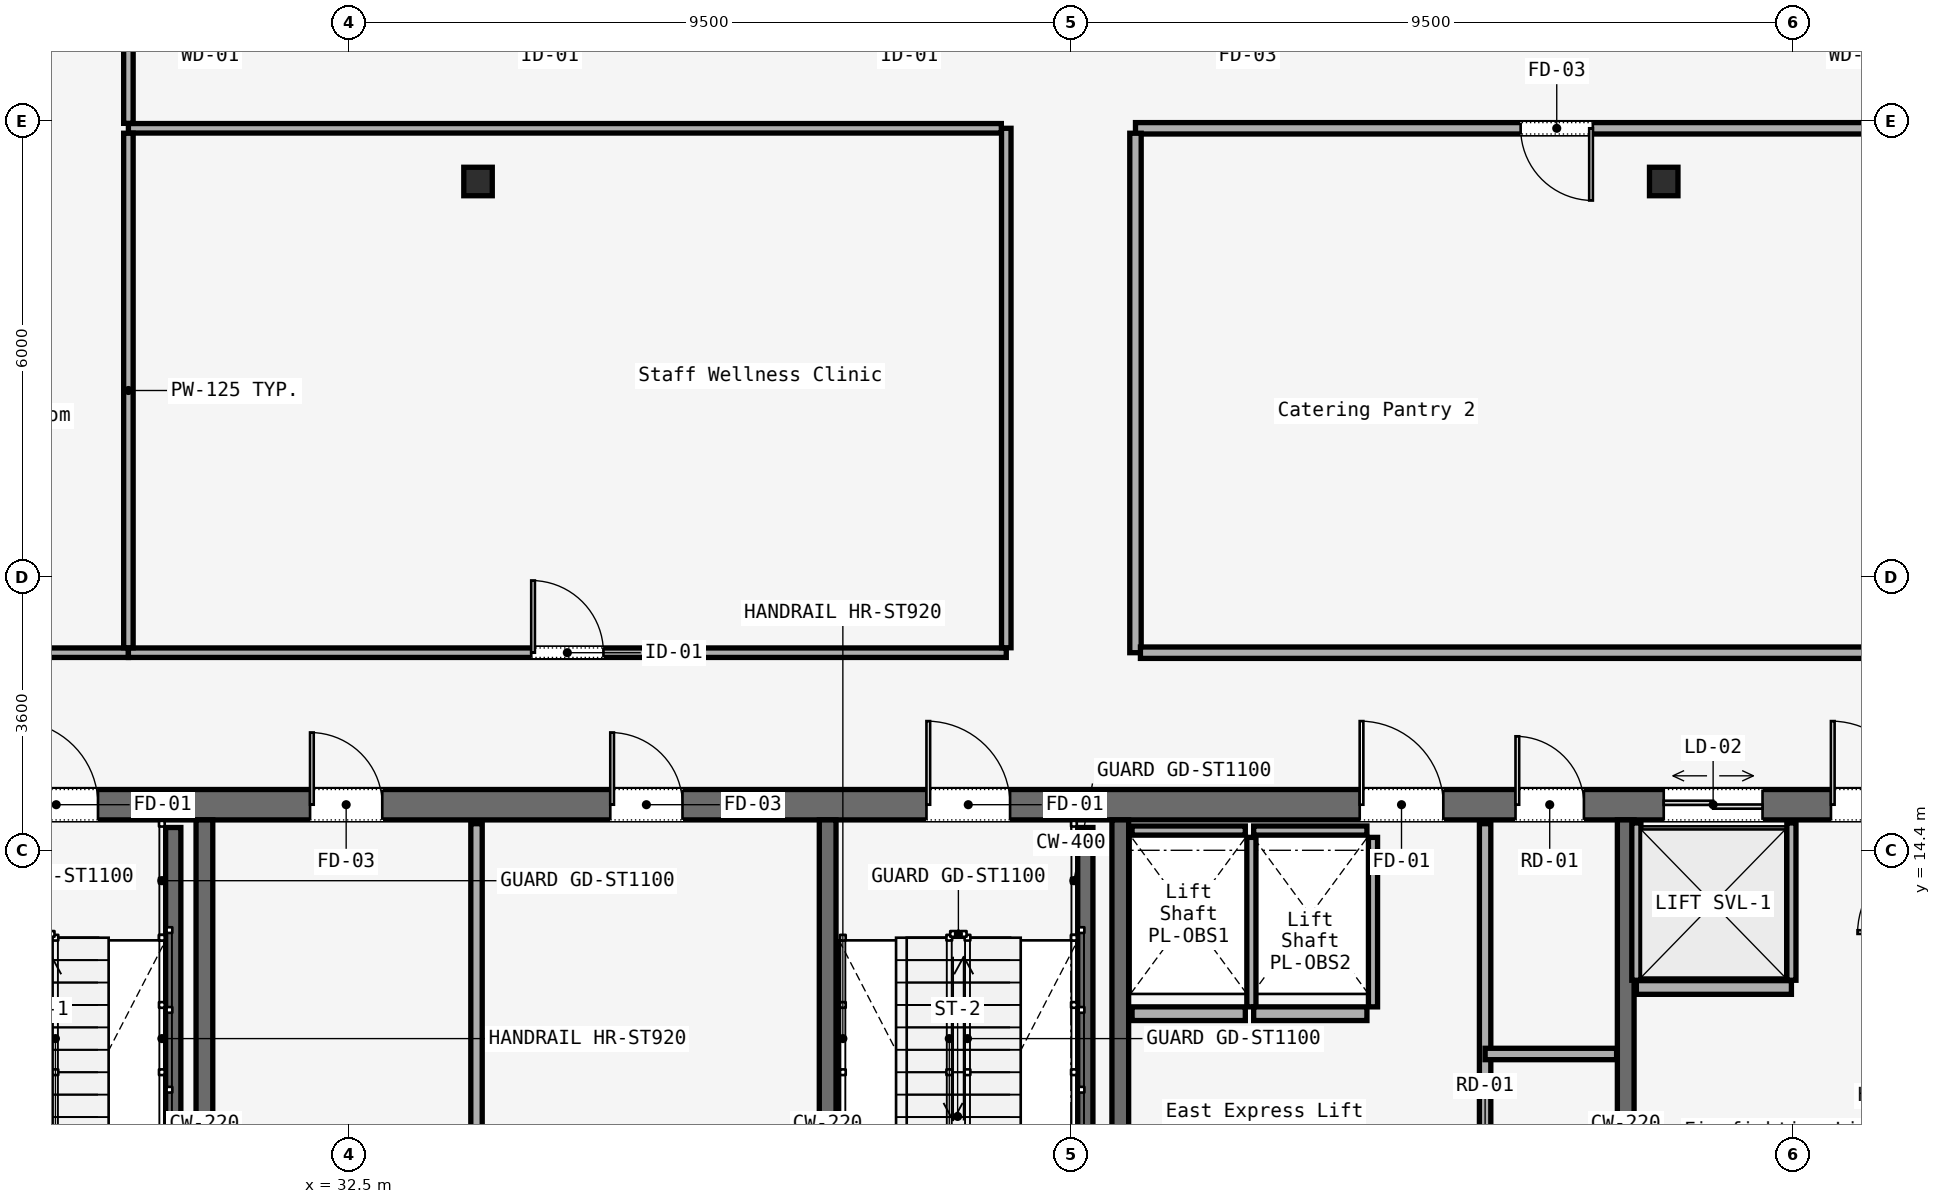
"""IFC4 building model, lengths in metres.
Left out: names, types, materials, properties, quantities, classifications, styles, units other than length and angle.
Written with IfcOpenShell. Run it as: python <this file> out.ifc"""

import sys

from ifc_helpers import new_model, si_unit, direction, frame, frame_2d, origin, origin_2d, place, context, subcontext, project, spatial, rectangle, i_section, extrude, element, fill, save


model = new_model("IFC4")
c1 = context("Model", 3, precision=1e-05, world=origin(), true_north=direction((0.0, 1.0)))
c2 = subcontext(c1, "Body", "Model", "MODEL_VIEW")
j1 = project(units=[si_unit("LENGTHUNIT", "METRE"), si_unit("PLANEANGLEUNIT", "RADIAN")], contexts=[c1])
p1 = place(None, origin())
s1 = spatial("IfcSite", under=j1, at=p1, CompositionType="ELEMENT")
p2 = place(p1, origin())
s2 = spatial("IfcBuilding", under=s1, at=p2, CompositionType="ELEMENT")
p3 = place(p2, frame((0.0, 0.0, 259.8)))
s3 = spatial("IfcBuildingStorey", under=s2, at=p3, CompositionType="ELEMENT", Elevation=259.8)
p4 = place(p3, frame((26.45, 15.0, 0.0), z_axis=(0.0, 0.0, 1.0), x_axis=(1.0, 0.0, 0.0)))
e1 = element("IfcWall", 1, at=p4, inside=s3, PredefinedType="SOLIDWALL", context=c2, shape_type="SweptSolid", body=[
    extrude(rectangle(XDim=31.1, YDim=0.4, at=frame_2d((15.55, 0.0))), origin(), (0.0, 0.0, 1.0), 3.58),
])
p5 = place(p4, frame((1.65, 0.0, 0.0)))
e2 = element("IfcOpeningElement", 2, at=p5, cuts=e1, PredefinedType="OPENING", context=c2, shape_type="SweptSolid", body=[
    extrude(rectangle(XDim=1.1, YDim=2.2, at=frame_2d((0.55, 1.1))), frame((0.0, 0.2, 0.0), z_axis=(0.0, -1.0, 0.0), x_axis=(1.0, 0.0, 0.0)), (0.0, 0.0, 1.0), 0.4),
])
p6 = place(p4, frame((13.65, 0.0, 0.0)))
e3 = element("IfcOpeningElement", 3, at=p6, cuts=e1, PredefinedType="OPENING", context=c2, shape_type="SweptSolid", body=[
    extrude(rectangle(XDim=1.1, YDim=2.2, at=frame_2d((0.55, 1.1))), frame((0.0, 0.2, 0.0), z_axis=(0.0, -1.0, 0.0), x_axis=(1.0, 0.0, 0.0)), (0.0, 0.0, 1.0), 0.4),
])
p7 = place(p4, frame((25.55, 0.0, 0.0)))
e4 = element("IfcOpeningElement", 4, at=p7, cuts=e1, PredefinedType="OPENING", context=c2, shape_type="SweptSolid", body=[
    extrude(rectangle(XDim=1.1, YDim=2.2, at=frame_2d((0.55, 1.1))), frame((0.0, 0.2, 0.0), z_axis=(0.0, -1.0, 0.0), x_axis=(1.0, 0.0, 0.0)), (0.0, 0.0, 1.0), 0.4),
])
p8 = place(p4, frame((19.35, 0.0, 0.0)))
e5 = element("IfcOpeningElement", 5, at=p8, cuts=e1, PredefinedType="OPENING", context=c2, shape_type="SweptSolid", body=[
    extrude(rectangle(XDim=1.1, YDim=2.2, at=frame_2d((0.55, 1.1))), frame((0.0, 0.2, 0.0), z_axis=(0.0, -1.0, 0.0), x_axis=(1.0, 0.0, 0.0)), (0.0, 0.0, 1.0), 0.4),
])
p9 = place(p4, frame((21.4, 0.0, 0.0)))
e6 = element("IfcOpeningElement", 6, at=p9, cuts=e1, PredefinedType="OPENING", context=c2, shape_type="SweptSolid", body=[
    extrude(rectangle(XDim=0.9, YDim=2.1, at=frame_2d((0.45, 1.05))), frame((0.0, 0.2, 0.0), z_axis=(0.0, -1.0, 0.0), x_axis=(1.0, 0.0, 0.0)), (0.0, 0.0, 1.0), 0.4),
])
p10 = place(p4, frame((5.54, 0.0, 0.0)))
e7 = element("IfcOpeningElement", 7, at=p10, cuts=e1, PredefinedType="OPENING", context=c2, shape_type="SweptSolid", body=[
    extrude(rectangle(XDim=0.95, YDim=2.2, at=frame_2d((0.475, 1.1))), frame((0.0, 0.2, 0.0), z_axis=(0.0, -1.0, 0.0), x_axis=(1.0, 0.0, 0.0)), (0.0, 0.0, 1.0), 0.4),
])
p11 = place(p4, frame((9.49, 0.0, 0.0)))
e8 = element("IfcOpeningElement", 8, at=p11, cuts=e1, PredefinedType="OPENING", context=c2, shape_type="SweptSolid", body=[
    extrude(rectangle(XDim=0.95, YDim=2.2, at=frame_2d((0.475, 1.1))), frame((0.0, 0.2, 0.0), z_axis=(0.0, -1.0, 0.0), x_axis=(1.0, 0.0, 0.0)), (0.0, 0.0, 1.0), 0.4),
])
p12 = place(p4, frame((23.35, 0.0, 0.0)))
e9 = element("IfcOpeningElement", 9, at=p12, cuts=e1, PredefinedType="OPENING", context=c2, shape_type="SweptSolid", body=[
    extrude(rectangle(XDim=1.3, YDim=2.3, at=frame_2d((0.65, 1.15))), frame((0.0, 0.2, 0.0), z_axis=(0.0, -1.0, 0.0), x_axis=(1.0, 0.0, 0.0)), (0.0, 0.0, 1.0), 0.4),
])
for number, where, z_axis, x_axis in (
    (10, (30.6, 5.8, 0.0), (0.0, 0.0, 1.0), (0.0, 1.0, 0.0)),
    (11, (38.8, 5.8, 0.0), (0.0, 0.0, 1.0), (0.0, 1.0, 0.0)),
    (12, (42.65, 5.8, 0.0), (0.0, 0.0, 1.0), (0.0, 1.0, 0.0)),
    (13, (49.3, 5.8, 0.0), (0.0, 0.0, 1.0), (0.0, 1.0, 0.0)),
):
    element("IfcWall", number, at=place(p3, frame(where, z_axis=z_axis, x_axis=x_axis)), inside=s3, PredefinedType="SOLIDWALL", context=c2, shape_type="SweptSolid", body=[
        extrude(rectangle(XDim=9.0, YDim=0.22, at=frame_2d((4.5, 0.0))), origin(), (0.0, 0.0, 1.0), 3.58),
    ])
for number, where, z_axis, x_axis in (
    (14, (34.2, 23.2, 0.0), (0.0, 0.0, 1.0), (1.0, 0.0, 0.0)),
    (15, (49.8, 23.2, 0.0), (0.0, 0.0, 1.0), (1.0, 0.0, 0.0)),
):
    element("IfcColumn", number, at=place(p3, frame(where, z_axis=z_axis, x_axis=x_axis)), inside=s3, PredefinedType="COLUMN", context=c2, shape_type="SweptSolid", body=[
        extrude(i_section(OverallWidth=0.375, OverallDepth=0.375, WebThickness=0.017, FlangeThickness=0.027, FilletRadius=0.015, at=origin_2d()), origin(), (0.0, 0.0, 1.0), 3.58),
    ])
for number, where, z_axis, x_axis in (
    (16, (30.19, 14.7, 0.0), (0.0, 0.0, 1.0), (0.0, -1.0, 0.0)),
    (17, (42.19, 14.7, 0.0), (0.0, 0.0, 1.0), (0.0, -1.0, 0.0)),
):
    element("IfcWall", number, at=place(p3, frame(where, z_axis=z_axis, x_axis=x_axis)), inside=s3, PredefinedType="SOLIDWALL", context=c2, shape_type="SweptSolid", body=[
        extrude(rectangle(XDim=7.65, YDim=0.2, at=frame_2d((3.825, 0.0))), origin(), (0.0, 0.0, 1.0), 3.8),
    ])
p13 = place(p3, frame((47.45, 5.9, 0.0), z_axis=(0.0, 0.0, 1.0), x_axis=(0.0, 1.0, 0.0)))
e18 = element("IfcWall", 18, at=p13, inside=s3, PredefinedType="PARTITIONING", context=c2, shape_type="SweptSolid", body=[
    extrude(rectangle(XDim=8.85, YDim=0.15, at=frame_2d((4.425, 0.0))), origin(), (0.0, 0.0, 1.0), 3.01),
])
p14 = place(p13, frame((3.9, 0.0, 0.0)))
e19 = element("IfcOpeningElement", 19, at=p14, cuts=e18, PredefinedType="OPENING", context=c2, shape_type="SweptSolid", body=[
    extrude(rectangle(XDim=0.9, YDim=2.1, at=frame_2d((0.45, 1.05))), frame((0.0, 0.075, 0.0), z_axis=(0.0, -1.0, 0.0), x_axis=(1.0, 0.0, 0.0)), (0.0, 0.0, 1.0), 0.15),
])
p15 = place(p3, frame((47.45, 11.72, 0.0), z_axis=(0.0, 0.0, 1.0), x_axis=(1.0, 0.0, 0.0)))
e20 = element("IfcWall", 20, at=p15, inside=s3, PredefinedType="PARTITIONING", context=c2, shape_type="SweptSolid", body=[
    extrude(rectangle(XDim=1.73, YDim=0.15, at=frame_2d((0.865, 0.0))), origin(), (0.0, 0.0, 1.0), 3.01),
])
p16 = place(p3, frame((34.18, 5.9, 0.0), z_axis=(0.0, 0.0, 1.0), x_axis=(0.0, 1.0, 0.0)))
e21 = element("IfcWall", 21, at=p16, inside=s3, PredefinedType="PARTITIONING", context=c2, shape_type="SweptSolid", body=[
    extrude(rectangle(XDim=8.85, YDim=0.15, at=frame_2d((4.425, 0.0))), origin(), (0.0, 0.0, 1.0), 3.01),
])
p17 = place(p3, frame((42.805, 12.25, 0.0), z_axis=(0.0, 0.0, 1.0), x_axis=(1.0, 0.0, 0.0)))
e22 = element("IfcWall", 22, at=p17, inside=s3, PredefinedType="SOLIDWALL", context=c2, shape_type="SweptSolid", body=[
    extrude(rectangle(XDim=1.49, YDim=0.18, at=frame_2d((0.745, 0.0))), origin(), (0.0, 0.0, 1.0), 3.01),
])
p18 = place(p3, frame((42.805, 14.66, 0.0), z_axis=(0.0, 0.0, 1.0), x_axis=(1.0, 0.0, 0.0)))
e23 = element("IfcWall", 23, at=p18, inside=s3, PredefinedType="SOLIDWALL", context=c2, shape_type="SweptSolid", body=[
    extrude(rectangle(XDim=1.49, YDim=0.12, at=frame_2d((0.745, 0.0))), origin(), (0.0, 0.0, 1.0), 3.01),
])
p19 = place(p3, frame((44.375, 12.34, 0.0), z_axis=(0.0, 0.0, 1.0), x_axis=(0.0, 1.0, 0.0)))
e24 = element("IfcWall", 24, at=p19, inside=s3, PredefinedType="SOLIDWALL", context=c2, shape_type="SweptSolid", body=[
    extrude(rectangle(XDim=2.23, YDim=0.12, at=frame_2d((1.115, 0.0))), origin(), (0.0, 0.0, 1.0), 3.01),
])
p20 = place(p3, frame((44.405, 12.25, 0.0), z_axis=(0.0, 0.0, 1.0), x_axis=(1.0, 0.0, 0.0)))
e25 = element("IfcWall", 25, at=p20, inside=s3, PredefinedType="SOLIDWALL", context=c2, shape_type="SweptSolid", body=[
    extrude(rectangle(XDim=1.49, YDim=0.18, at=frame_2d((0.745, 0.0))), origin(), (0.0, 0.0, 1.0), 3.01),
])
p21 = place(p3, frame((44.405, 14.66, 0.0), z_axis=(0.0, 0.0, 1.0), x_axis=(1.0, 0.0, 0.0)))
e26 = element("IfcWall", 26, at=p21, inside=s3, PredefinedType="SOLIDWALL", context=c2, shape_type="SweptSolid", body=[
    extrude(rectangle(XDim=1.49, YDim=0.12, at=frame_2d((0.745, 0.0))), origin(), (0.0, 0.0, 1.0), 3.01),
])
p22 = place(p3, frame((45.975, 12.34, 0.0), z_axis=(0.0, 0.0, 1.0), x_axis=(0.0, 1.0, 0.0)))
e27 = element("IfcWall", 27, at=p22, inside=s3, PredefinedType="SOLIDWALL", context=c2, shape_type="SweptSolid", body=[
    extrude(rectangle(XDim=2.23, YDim=0.12, at=frame_2d((1.115, 0.0))), origin(), (0.0, 0.0, 1.0), 3.01),
])
p23 = place(p3, frame((49.44, 12.595, 0.0), z_axis=(0.0, 0.0, 1.0), x_axis=(1.0, 0.0, 0.0)))
e28 = element("IfcWall", 28, at=p23, inside=s3, PredefinedType="SOLIDWALL", context=c2, shape_type="SweptSolid", body=[
    extrude(rectangle(XDim=2.04, YDim=0.18, at=frame_2d((1.02, 0.0))), origin(), (0.0, 0.0, 1.0), 3.01),
])
for number, where, z_axis, x_axis in (
    (29, (49.44, 12.69, 0.0), (0.0, 0.0, 1.0), (0.0, 1.0, 0.0)),
    (30, (51.48, 12.69, 0.0), (0.0, 0.0, 1.0), (0.0, 1.0, 0.0)),
):
    element("IfcWall", number, at=place(p3, frame(where, z_axis=z_axis, x_axis=x_axis)), inside=s3, PredefinedType="SOLIDWALL", context=c2, shape_type="SweptSolid", body=[
        extrude(rectangle(XDim=2.07, YDim=0.12, at=frame_2d((1.035, 0.0))), origin(), (0.0, 0.0, 1.0), 3.01),
    ])
p24 = place(p3, frame((23.38, 17.0, 0.0), z_axis=(0.0, 0.0, 1.0), x_axis=(1.0, 0.0, 0.0)))
e31 = element("IfcWall", 31, at=p24, inside=s3, PredefinedType="PARTITIONING", context=c2, shape_type="SweptSolid", body=[
    extrude(rectangle(XDim=6.22, YDim=0.125, at=frame_2d((3.11, 0.0))), origin(), (0.0, 0.0, 1.0), 3.01),
])
p25 = place(p24, frame((2.41, 0.0, 0.0)))
e32 = element("IfcOpeningElement", 32, at=p25, cuts=e31, PredefinedType="OPENING", context=c2, shape_type="SweptSolid", body=[
    extrude(rectangle(XDim=1.4, YDim=2.2, at=frame_2d((0.7, 1.1))), frame((0.0, 0.062, 0.0), z_axis=(0.0, -1.0, 0.0), x_axis=(1.0, 0.0, 0.0)), (0.0, 0.0, 1.0), 0.125),
])
p26 = place(p3, frame((29.6, 17.0, 0.0), z_axis=(0.0, 0.0, 1.0), x_axis=(1.0, 0.0, 0.0)))
e33 = element("IfcWall", 33, at=p26, inside=s3, PredefinedType="PARTITIONING", context=c2, shape_type="SweptSolid", body=[
    extrude(rectangle(XDim=11.55, YDim=0.125, at=frame_2d((5.775, 0.0))), origin(), (0.0, 0.0, 1.0), 3.01),
])
p27 = place(p26, frame((5.3, 0.0, 0.0)))
e34 = element("IfcOpeningElement", 34, at=p27, cuts=e33, PredefinedType="OPENING", context=c2, shape_type="SweptSolid", body=[
    extrude(rectangle(XDim=0.95, YDim=2.2, at=frame_2d((0.475, 1.1))), frame((0.0, 0.062, 0.0), z_axis=(0.0, -1.0, 0.0), x_axis=(1.0, 0.0, 0.0)), (0.0, 0.0, 1.0), 0.125),
])
p28 = place(p3, frame((41.15, 17.065, 0.0), z_axis=(0.0, 0.0, 1.0), x_axis=(0.0, 1.0, 0.0)))
e35 = element("IfcWall", 35, at=p28, inside=s3, PredefinedType="PARTITIONING", context=c2, shape_type="SweptSolid", body=[
    extrude(rectangle(XDim=6.835, YDim=0.125, at=frame_2d((3.417, 0.0))), origin(), (0.0, 0.0, 1.0), 3.01),
])
p29 = place(p3, frame((41.085, 23.9, 0.0), z_axis=(0.0, 0.0, 1.0), x_axis=(-1.0, 0.0, 0.0)))
e36 = element("IfcWall", 36, at=p29, inside=s3, PredefinedType="PARTITIONING", context=c2, shape_type="SweptSolid", body=[
    extrude(rectangle(XDim=11.485, YDim=0.125, at=frame_2d((5.742, 0.0))), origin(), (0.0, 0.0, 1.0), 3.01),
])
p30 = place(p3, frame((29.6, 23.965, 0.0), z_axis=(0.0, 0.0, 1.0), x_axis=(0.0, 1.0, 0.0)))
e37 = element("IfcWall", 37, at=p30, inside=s3, PredefinedType="PARTITIONING", context=c2, shape_type="SweptSolid", body=[
    extrude(rectangle(XDim=1.635, YDim=0.125, at=frame_2d((0.817, 0.0))), origin(), (0.0, 0.0, 1.0), 3.01),
])
p31 = place(p3, frame((53.935, 23.9, 0.0), z_axis=(0.0, 0.0, 1.0), x_axis=(-1.0, 0.0, 0.0)))
e38 = element("IfcWall", 38, at=p31, inside=s3, PredefinedType="PARTITIONING", context=c2, shape_type="SweptSolid", body=[
    extrude(rectangle(XDim=11.085, YDim=0.15, at=frame_2d((5.542, 0.0))), origin(), (0.0, 0.0, 1.0), 3.01),
])
p32 = place(p31, frame((5.067, 0.0, 0.0)))
e39 = element("IfcOpeningElement", 39, at=p32, cuts=e38, PredefinedType="OPENING", context=c2, shape_type="SweptSolid", body=[
    extrude(rectangle(XDim=0.95, YDim=2.2, at=frame_2d((0.475, 1.1))), frame((0.0, 0.075, 0.0), z_axis=(0.0, -1.0, 0.0), x_axis=(1.0, 0.0, 0.0)), (0.0, 0.0, 1.0), 0.15),
])
p33 = place(p3, frame((42.85, 23.835, 0.0), z_axis=(0.0, 0.0, 1.0), x_axis=(0.0, -1.0, 0.0)))
e40 = element("IfcWall", 40, at=p33, inside=s3, PredefinedType="PARTITIONING", context=c2, shape_type="SweptSolid", body=[
    extrude(rectangle(XDim=6.835, YDim=0.15, at=frame_2d((3.417, 0.0))), origin(), (0.0, 0.0, 1.0), 3.01),
])
p34 = place(p3, frame((42.915, 17.0, 0.0), z_axis=(0.0, 0.0, 1.0), x_axis=(1.0, 0.0, 0.0)))
e41 = element("IfcWall", 41, at=p34, inside=s3, PredefinedType="PARTITIONING", context=c2, shape_type="SweptSolid", body=[
    extrude(rectangle(XDim=11.085, YDim=0.15, at=frame_2d((5.542, 0.0))), origin(), (0.0, 0.0, 1.0), 3.01),
])
p35 = place(p3, frame((29.6, 23.835, 0.0), z_axis=(0.0, 0.0, 1.0), x_axis=(0.0, -1.0, 0.0)))
e42 = element("IfcWall", 42, at=p35, inside=s3, PredefinedType="PARTITIONING", context=c2, shape_type="SweptSolid", body=[
    extrude(rectangle(XDim=6.77, YDim=0.125, at=frame_2d((3.385, 0.0))), origin(), (0.0, 0.0, 1.0), 3.01),
])
p36 = place(p5, origin())
e43 = element("IfcDoor", 43, at=p36, inside=s3, OperationType="SINGLE_SWING_RIGHT", PredefinedType="DOOR", context=c2, shape_type="SweptSolid", body=[
    extrude(rectangle(XDim=1.1, YDim=2.2, at=frame_2d((0.55, 1.1))), frame((0.0, 0.025, 0.0), z_axis=(0.0, -1.0, 0.0), x_axis=(1.0, 0.0, 0.0)), (0.0, 0.0, 1.0), 0.05),
])
fill(e2, e43)
p37 = place(p6, origin())
e44 = element("IfcDoor", 44, at=p37, inside=s3, OperationType="SINGLE_SWING_LEFT", PredefinedType="DOOR", context=c2, shape_type="SweptSolid", body=[
    extrude(rectangle(XDim=1.1, YDim=2.2, at=frame_2d((0.55, 1.1))), frame((0.0, 0.025, 0.0), z_axis=(0.0, -1.0, 0.0), x_axis=(1.0, 0.0, 0.0)), (0.0, 0.0, 1.0), 0.05),
])
fill(e3, e44)
p38 = place(p7, origin())
e45 = element("IfcDoor", 45, at=p38, inside=s3, OperationType="SINGLE_SWING_RIGHT", PredefinedType="DOOR", context=c2, shape_type="SweptSolid", body=[
    extrude(rectangle(XDim=1.1, YDim=2.2, at=frame_2d((0.55, 1.1))), frame((0.0, 0.025, 0.0), z_axis=(0.0, -1.0, 0.0), x_axis=(1.0, 0.0, 0.0)), (0.0, 0.0, 1.0), 0.05),
])
fill(e4, e45)
p39 = place(p8, origin())
e46 = element("IfcDoor", 46, at=p39, inside=s3, OperationType="SINGLE_SWING_LEFT", PredefinedType="DOOR", context=c2, shape_type="SweptSolid", body=[
    extrude(rectangle(XDim=1.1, YDim=2.2, at=frame_2d((0.55, 1.1))), frame((0.0, 0.025, 0.0), z_axis=(0.0, -1.0, 0.0), x_axis=(1.0, 0.0, 0.0)), (0.0, 0.0, 1.0), 0.05),
])
fill(e5, e46)
p40 = place(p9, origin())
e47 = element("IfcDoor", 47, at=p40, inside=s3, OperationType="SINGLE_SWING_LEFT", PredefinedType="DOOR", context=c2, shape_type="SweptSolid", body=[
    extrude(rectangle(XDim=0.9, YDim=2.1, at=frame_2d((0.45, 1.05))), frame((0.0, 0.025, 0.0), z_axis=(0.0, -1.0, 0.0), x_axis=(1.0, 0.0, 0.0)), (0.0, 0.0, 1.0), 0.05),
])
fill(e6, e47)
p41 = place(p10, origin())
e48 = element("IfcDoor", 48, at=p41, inside=s3, OperationType="SINGLE_SWING_LEFT", PredefinedType="DOOR", context=c2, shape_type="SweptSolid", body=[
    extrude(rectangle(XDim=0.95, YDim=2.2, at=frame_2d((0.475, 1.1))), frame((0.0, 0.025, 0.0), z_axis=(0.0, -1.0, 0.0), x_axis=(1.0, 0.0, 0.0)), (0.0, 0.0, 1.0), 0.05),
])
fill(e7, e48)
p42 = place(p11, origin())
e49 = element("IfcDoor", 49, at=p42, inside=s3, OperationType="SINGLE_SWING_RIGHT", PredefinedType="DOOR", context=c2, shape_type="SweptSolid", body=[
    extrude(rectangle(XDim=0.95, YDim=2.2, at=frame_2d((0.475, 1.1))), frame((0.0, 0.025, 0.0), z_axis=(0.0, -1.0, 0.0), x_axis=(1.0, 0.0, 0.0)), (0.0, 0.0, 1.0), 0.05),
])
fill(e8, e49)
p43 = place(p12, origin())
e50 = element("IfcDoor", 50, at=p43, inside=s3, OperationType="DOUBLE_DOOR_SLIDING", PredefinedType="DOOR", context=c2, shape_type="SweptSolid", body=[
    extrude(rectangle(XDim=1.3, YDim=2.3, at=frame_2d((0.65, 1.15))), frame((0.0, 0.025, 0.0), z_axis=(0.0, -1.0, 0.0), x_axis=(1.0, 0.0, 0.0)), (0.0, 0.0, 1.0), 0.05),
])
fill(e9, e50)
p44 = place(p27, origin())
e51 = element("IfcDoor", 51, at=p44, inside=s3, OperationType="SINGLE_SWING_LEFT", PredefinedType="DOOR", context=c2, shape_type="SweptSolid", body=[
    extrude(rectangle(XDim=0.95, YDim=2.2, at=frame_2d((0.475, 1.1))), frame((0.0, 0.025, 0.0), z_axis=(0.0, -1.0, 0.0), x_axis=(1.0, 0.0, 0.0)), (0.0, 0.0, 1.0), 0.05),
])
fill(e34, e51)
p45 = place(p32, origin())
e52 = element("IfcDoor", 52, at=p45, inside=s3, OperationType="SINGLE_SWING_RIGHT", PredefinedType="DOOR", context=c2, shape_type="SweptSolid", body=[
    extrude(rectangle(XDim=0.95, YDim=2.2, at=frame_2d((0.475, 1.1))), frame((0.0, 0.025, 0.0), z_axis=(0.0, -1.0, 0.0), x_axis=(1.0, 0.0, 0.0)), (0.0, 0.0, 1.0), 0.05),
])
fill(e39, e52)
save(model, sys.argv[1])
